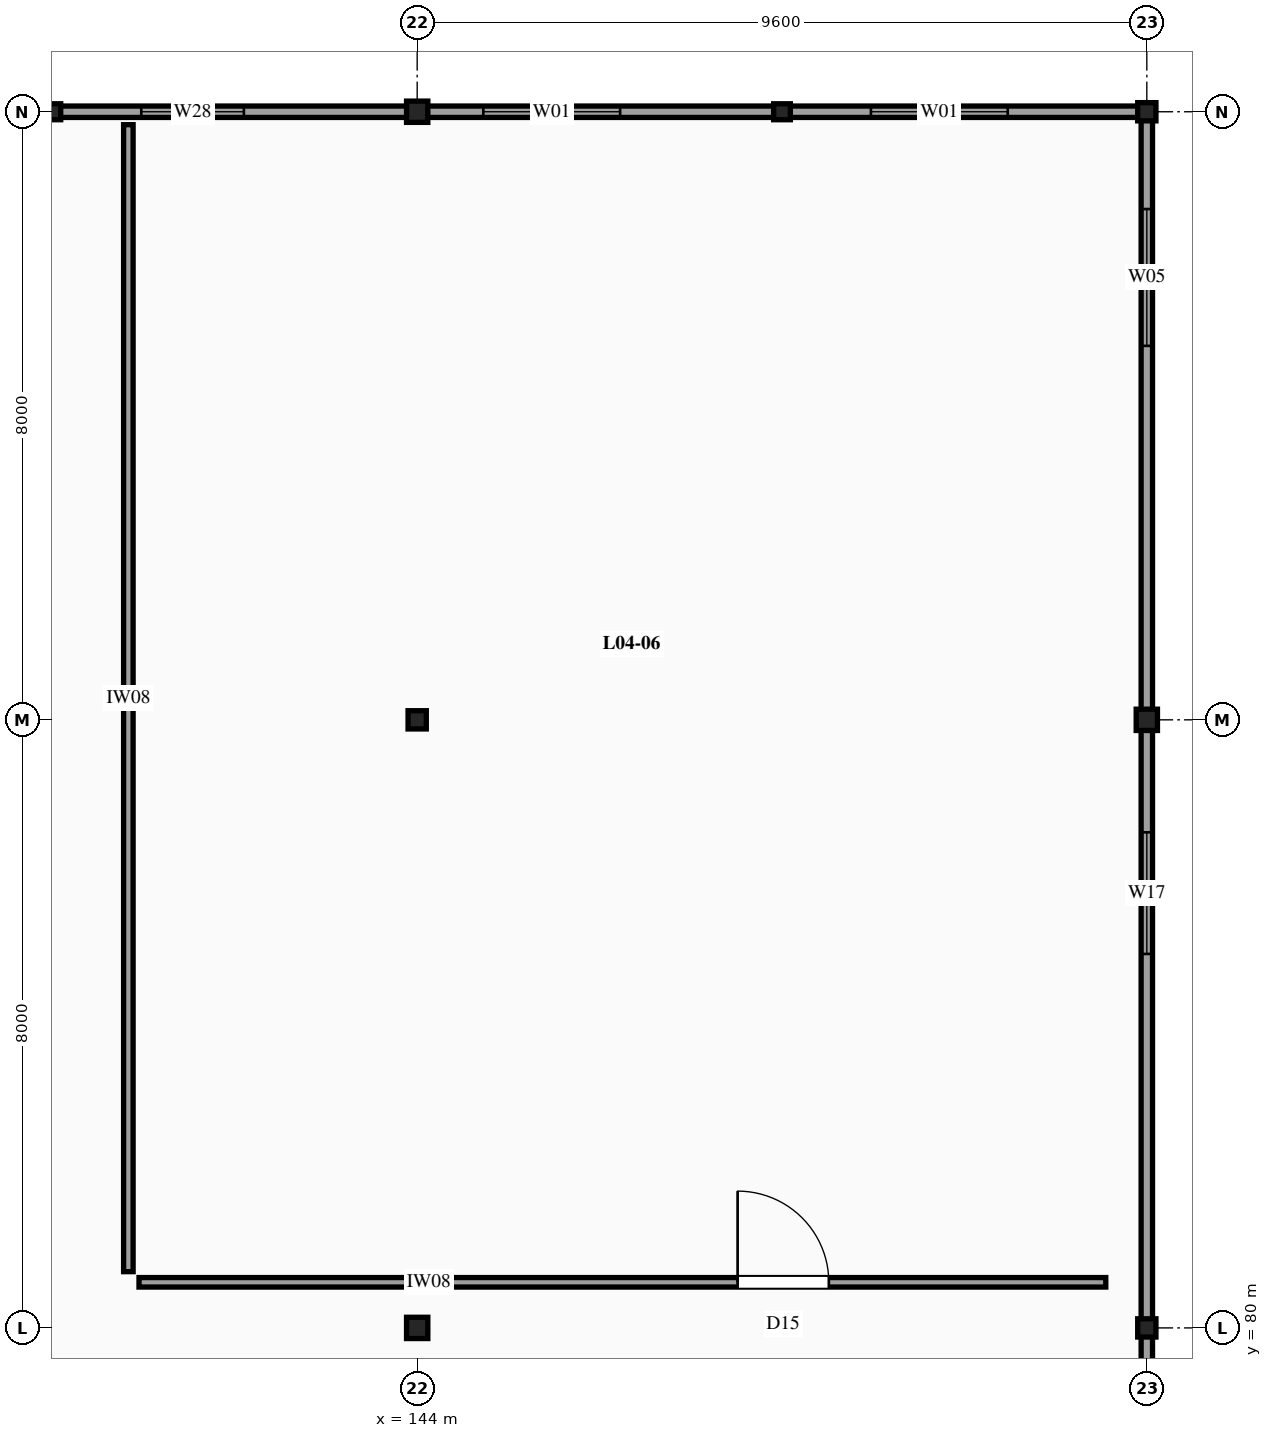
"""IFC4 building model, lengths in metres.
Left out: names, types, materials, properties, quantities, classifications, styles, units other than length and angle.
Written with IfcOpenShell. Run it as: python <this file> out.ifc"""

import sys

from ifc_helpers import new_model, si_unit, direction, frame, frame_2d, origin, origin_2d, place, context, subcontext, project, spatial, rectangle, i_section, extrude, element, fill, save


model = new_model("IFC4")
c1 = context("Model", 3, precision=1e-05, world=origin(), true_north=direction((0.0, 1.0)))
c2 = subcontext(c1, "Body", "Model", "MODEL_VIEW")
j1 = project(units=[si_unit("LENGTHUNIT", "METRE"), si_unit("PLANEANGLEUNIT", "RADIAN")], contexts=[c1])
p1 = place(None, origin())
s1 = spatial("IfcSite", under=j1, at=p1, CompositionType="ELEMENT")
p2 = place(p1, origin())
s2 = spatial("IfcBuilding", under=s1, at=p2, CompositionType="ELEMENT")
p3 = place(p2, frame((0.0, 0.0, 17.4)))
s3 = spatial("IfcBuildingStorey", under=s2, at=p3, CompositionType="ELEMENT", Elevation=17.4)
p4 = place(p3, frame((144.0, 80.0, -0.28), z_axis=(0.0, 0.0, 1.0), x_axis=(1.0, 0.0, 0.0)))
e1 = element("IfcColumn", 1, at=p4, inside=s3, PredefinedType="COLUMN", context=c2, shape_type="SweptSolid", body=[
    extrude(i_section(OverallWidth=0.28, OverallDepth=0.28, WebThickness=0.01, FlangeThickness=0.018, FilletRadius=0.024, at=origin_2d()), origin(), (0.0, 0.0, 1.0), 8.43),
])
p5 = place(p3, frame((144.0, 88.0, -0.28), z_axis=(0.0, 0.0, 1.0), x_axis=(1.0, 0.0, 0.0)))
e2 = element("IfcColumn", 2, at=p5, inside=s3, PredefinedType="COLUMN", context=c2, shape_type="SweptSolid", body=[
    extrude(i_section(OverallWidth=0.24, OverallDepth=0.24, WebThickness=0.01, FlangeThickness=0.017, FilletRadius=0.021, at=origin_2d()), origin(), (0.0, 0.0, 1.0), 8.43),
])
p6 = place(p3, frame((144.0, 96.0, -0.28), z_axis=(0.0, 0.0, 1.0), x_axis=(1.0, 0.0, 0.0)))
e3 = element("IfcColumn", 3, at=p6, inside=s3, PredefinedType="COLUMN", context=c2, shape_type="SweptSolid", body=[
    extrude(i_section(OverallWidth=0.28, OverallDepth=0.28, WebThickness=0.01, FlangeThickness=0.018, FilletRadius=0.024, at=origin_2d()), origin(), (0.0, 0.0, 1.0), 8.43),
])
p7 = place(p3, frame((153.6, 80.0, -0.28), z_axis=(0.0, 0.0, 1.0), x_axis=(1.0, 0.0, 0.0)))
e4 = element("IfcColumn", 4, at=p7, inside=s3, PredefinedType="COLUMN", context=c2, shape_type="SweptSolid", body=[
    extrude(i_section(OverallWidth=0.24, OverallDepth=0.24, WebThickness=0.01, FlangeThickness=0.017, FilletRadius=0.021, at=origin_2d()), origin(), (0.0, 0.0, 1.0), 8.43),
])
p8 = place(p3, frame((153.6, 88.0, -0.28), z_axis=(0.0, 0.0, 1.0), x_axis=(1.0, 0.0, 0.0)))
e5 = element("IfcColumn", 5, at=p8, inside=s3, PredefinedType="COLUMN", context=c2, shape_type="SweptSolid", body=[
    extrude(i_section(OverallWidth=0.28, OverallDepth=0.28, WebThickness=0.01, FlangeThickness=0.018, FilletRadius=0.024, at=origin_2d()), origin(), (0.0, 0.0, 1.0), 8.43),
])
p9 = place(p3, frame((153.6, 96.0, -0.28), z_axis=(0.0, 0.0, 1.0), x_axis=(1.0, 0.0, 0.0)))
e6 = element("IfcColumn", 6, at=p9, inside=s3, PredefinedType="COLUMN", context=c2, shape_type="SweptSolid", body=[
    extrude(i_section(OverallWidth=0.24, OverallDepth=0.24, WebThickness=0.01, FlangeThickness=0.017, FilletRadius=0.021, at=origin_2d()), origin(), (0.0, 0.0, 1.0), 8.43),
])
for number, where, z_axis, x_axis in (
    (7, (139.2, 96.0, -0.28), (0.0, 0.0, 1.0), (1.0, 0.0, 0.0)),
    (8, (148.8, 96.0, -0.28), (0.0, 0.0, 1.0), (1.0, 0.0, 0.0)),
):
    element("IfcColumn", number, at=place(p3, frame(where, z_axis=z_axis, x_axis=x_axis)), inside=s3, PredefinedType="PILASTER", context=c2, shape_type="SweptSolid", body=[
        extrude(i_section(OverallWidth=0.22, OverallDepth=0.21, WebThickness=0.007, FlangeThickness=0.011, FilletRadius=0.018, at=origin_2d()), origin(), (0.0, 0.0, 1.0), 8.28),
    ])
p10 = place(p3, frame((134.42, 96.0, 0.0), z_axis=(0.0, 0.0, 1.0), x_axis=(1.0, 0.0, 0.0)))
e9 = element("IfcWall", 9, at=p10, inside=s3, PredefinedType="SOLIDWALL", context=c2, shape_type="SweptSolid", body=[
    extrude(rectangle(XDim=9.56, YDim=0.15, at=frame_2d((4.78, 0.0))), origin(), (0.0, 0.0, 1.0), 7.75),
])
p11 = place(p10, frame((0.85, 0.0, 0.85)))
e10 = element("IfcOpeningElement", 10, at=p11, cuts=e9, PredefinedType="OPENING", context=c2, shape_type="SweptSolid", body=[
    extrude(rectangle(XDim=1.35, YDim=1.7, at=frame_2d((0.675, 0.85))), frame((0.0, 0.085, 0.0), z_axis=(0.0, -1.0, 0.0), x_axis=(1.0, 0.0, 0.0)), (0.0, 0.0, 1.0), 0.17),
])
p12 = place(p10, frame((5.95, 0.0, 0.85)))
e11 = element("IfcOpeningElement", 11, at=p12, cuts=e9, PredefinedType="OPENING", context=c2, shape_type="SweptSolid", body=[
    extrude(rectangle(XDim=1.35, YDim=1.7, at=frame_2d((0.675, 0.85))), frame((0.0, 0.085, 0.0), z_axis=(0.0, -1.0, 0.0), x_axis=(1.0, 0.0, 0.0)), (0.0, 0.0, 1.0), 0.17),
])
p13 = place(p3, frame((144.02, 96.0, 0.0), z_axis=(0.0, 0.0, 1.0), x_axis=(1.0, 0.0, 0.0)))
e12 = element("IfcWall", 12, at=p13, inside=s3, PredefinedType="SOLIDWALL", context=c2, shape_type="SweptSolid", body=[
    extrude(rectangle(XDim=9.56, YDim=0.15, at=frame_2d((4.78, 0.0))), origin(), (0.0, 0.0, 1.0), 7.75),
])
p14 = place(p13, frame((0.85, 0.0, 0.85)))
e13 = element("IfcOpeningElement", 13, at=p14, cuts=e12, PredefinedType="OPENING", context=c2, shape_type="SweptSolid", body=[
    extrude(rectangle(XDim=1.8, YDim=2.8, at=frame_2d((0.9, 1.4))), frame((0.0, 0.085, 0.0), z_axis=(0.0, -1.0, 0.0), x_axis=(1.0, 0.0, 0.0)), (0.0, 0.0, 1.0), 0.17),
])
p15 = place(p13, frame((5.95, 0.0, 0.85)))
e14 = element("IfcOpeningElement", 14, at=p15, cuts=e12, PredefinedType="OPENING", context=c2, shape_type="SweptSolid", body=[
    extrude(rectangle(XDim=1.8, YDim=2.8, at=frame_2d((0.9, 1.4))), frame((0.0, 0.085, 0.0), z_axis=(0.0, -1.0, 0.0), x_axis=(1.0, 0.0, 0.0)), (0.0, 0.0, 1.0), 0.17),
])
p16 = place(p3, frame((153.6, 72.02, 0.0), z_axis=(0.0, 0.0, 1.0), x_axis=(0.0, 1.0, 0.0)))
e15 = element("IfcWall", 15, at=p16, inside=s3, PredefinedType="SOLIDWALL", context=c2, shape_type="SweptSolid", body=[
    extrude(rectangle(XDim=7.96, YDim=0.15, at=frame_2d((3.98, 0.0))), origin(), (0.0, 0.0, 1.0), 7.75),
])
p17 = place(p16, frame((4.9, 0.0, 0.9)))
e16 = element("IfcOpeningElement", 16, at=p17, cuts=e15, PredefinedType="OPENING", context=c2, shape_type="SweptSolid", body=[
    extrude(rectangle(XDim=2.0, YDim=2.2, at=frame_2d((1.0, 1.1))), frame((0.0, 0.085, 0.0), z_axis=(0.0, -1.0, 0.0), x_axis=(1.0, 0.0, 0.0)), (0.0, 0.0, 1.0), 0.17),
])
p18 = place(p3, frame((153.6, 80.02, 0.0), z_axis=(0.0, 0.0, 1.0), x_axis=(0.0, 1.0, 0.0)))
e17 = element("IfcWall", 17, at=p18, inside=s3, PredefinedType="SOLIDWALL", context=c2, shape_type="SweptSolid", body=[
    extrude(rectangle(XDim=7.96, YDim=0.15, at=frame_2d((3.98, 0.0))), origin(), (0.0, 0.0, 1.0), 7.75),
])
p19 = place(p18, frame((4.9, 0.0, 0.9)))
e18 = element("IfcOpeningElement", 18, at=p19, cuts=e17, PredefinedType="OPENING", context=c2, shape_type="SweptSolid", body=[
    extrude(rectangle(XDim=1.6, YDim=2.0, at=frame_2d((0.8, 1.0))), frame((0.0, 0.085, 0.0), z_axis=(0.0, -1.0, 0.0), x_axis=(1.0, 0.0, 0.0)), (0.0, 0.0, 1.0), 0.17),
])
p20 = place(p3, frame((153.6, 88.02, 0.0), z_axis=(0.0, 0.0, 1.0), x_axis=(0.0, 1.0, 0.0)))
e19 = element("IfcWall", 19, at=p20, inside=s3, PredefinedType="SOLIDWALL", context=c2, shape_type="SweptSolid", body=[
    extrude(rectangle(XDim=7.96, YDim=0.15, at=frame_2d((3.98, 0.0))), origin(), (0.0, 0.0, 1.0), 7.75),
])
p21 = place(p20, frame((4.9, 0.0, 0.9)))
e20 = element("IfcOpeningElement", 20, at=p21, cuts=e19, PredefinedType="OPENING", context=c2, shape_type="SweptSolid", body=[
    extrude(rectangle(XDim=1.8, YDim=2.4, at=frame_2d((0.9, 1.2))), frame((0.0, 0.085, 0.0), z_axis=(0.0, -1.0, 0.0), x_axis=(1.0, 0.0, 0.0)), (0.0, 0.0, 1.0), 0.17),
])
p22 = place(p3, frame((140.34, 80.6, 0.0), z_axis=(0.0, 0.0, 1.0), x_axis=(1.0, 0.0, 0.0)))
e21 = element("IfcWall", 21, at=p22, inside=s3, PredefinedType="PARTITIONING", context=c2, shape_type="SweptSolid", body=[
    extrude(rectangle(XDim=12.72, YDim=0.125, at=frame_2d((6.36, 0.0))), origin(), (0.0, 0.0, 1.0), 7.5),
])
p23 = place(p22, frame((7.876, 0.0, 0.0)))
e22 = element("IfcOpeningElement", 22, at=p23, cuts=e21, PredefinedType="OPENING", context=c2, shape_type="SweptSolid", body=[
    extrude(rectangle(XDim=1.2, YDim=2.18, at=frame_2d((0.6, 1.09))), frame((0.0, 0.073, 0.0), z_axis=(0.0, -1.0, 0.0), x_axis=(1.0, 0.0, 0.0)), (0.0, 0.0, 1.0), 0.145),
])
p24 = place(p3, frame((140.2, 80.74, 0.0), z_axis=(0.0, 0.0, 1.0), x_axis=(0.0, 1.0, 0.0)))
e23 = element("IfcWall", 23, at=p24, inside=s3, PredefinedType="PARTITIONING", context=c2, shape_type="SweptSolid", body=[
    extrude(rectangle(XDim=15.09, YDim=0.125, at=frame_2d((7.545, 0.0))), origin(), (0.0, 0.0, 1.0), 7.5),
])
p25 = place(p12, origin())
e24 = element("IfcWindow", 24, at=p25, inside=s3, PartitioningType="SINGLE_PANEL", PredefinedType="WINDOW", context=c2, shape_type="SweptSolid", body=[
    extrude(rectangle(XDim=1.35, YDim=1.7, at=frame_2d((0.675, 0.85))), frame((0.0, 0.03, 0.0), z_axis=(0.0, -1.0, 0.0), x_axis=(1.0, 0.0, 0.0)), (0.0, 0.0, 1.0), 0.06),
])
fill(e11, e24)
p26 = place(p14, origin())
e25 = element("IfcWindow", 25, at=p26, inside=s3, PartitioningType="SINGLE_PANEL", PredefinedType="WINDOW", context=c2, shape_type="SweptSolid", body=[
    extrude(rectangle(XDim=1.8, YDim=2.8, at=frame_2d((0.9, 1.4))), frame((0.0, 0.03, 0.0), z_axis=(0.0, -1.0, 0.0), x_axis=(1.0, 0.0, 0.0)), (0.0, 0.0, 1.0), 0.06),
])
fill(e13, e25)
p27 = place(p15, origin())
e26 = element("IfcWindow", 26, at=p27, inside=s3, PartitioningType="SINGLE_PANEL", PredefinedType="WINDOW", context=c2, shape_type="SweptSolid", body=[
    extrude(rectangle(XDim=1.8, YDim=2.8, at=frame_2d((0.9, 1.4))), frame((0.0, 0.03, 0.0), z_axis=(0.0, -1.0, 0.0), x_axis=(1.0, 0.0, 0.0)), (0.0, 0.0, 1.0), 0.06),
])
fill(e14, e26)
p28 = place(p19, origin())
e27 = element("IfcWindow", 27, at=p28, inside=s3, PartitioningType="SINGLE_PANEL", PredefinedType="WINDOW", context=c2, shape_type="SweptSolid", body=[
    extrude(rectangle(XDim=1.6, YDim=2.0, at=frame_2d((0.8, 1.0))), frame((0.0, 0.03, 0.0), z_axis=(0.0, -1.0, 0.0), x_axis=(1.0, 0.0, 0.0)), (0.0, 0.0, 1.0), 0.06),
])
fill(e18, e27)
p29 = place(p21, origin())
e28 = element("IfcWindow", 28, at=p29, inside=s3, PartitioningType="SINGLE_PANEL", PredefinedType="WINDOW", context=c2, shape_type="SweptSolid", body=[
    extrude(rectangle(XDim=1.8, YDim=2.4, at=frame_2d((0.9, 1.2))), frame((0.0, 0.03, 0.0), z_axis=(0.0, -1.0, 0.0), x_axis=(1.0, 0.0, 0.0)), (0.0, 0.0, 1.0), 0.06),
])
fill(e20, e28)
p30 = place(p23, origin())
e29 = element("IfcDoor", 29, at=p30, inside=s3, OperationType="SINGLE_SWING_LEFT", PredefinedType="DOOR", context=c2, shape_type="SweptSolid", body=[
    extrude(rectangle(XDim=1.2, YDim=2.18, at=frame_2d((0.6, 1.09))), frame((0.0, 0.025, 0.0), z_axis=(0.0, -1.0, 0.0), x_axis=(1.0, 0.0, 0.0)), (0.0, 0.0, 1.0), 0.05),
])
fill(e22, e29)
save(model, sys.argv[1])
